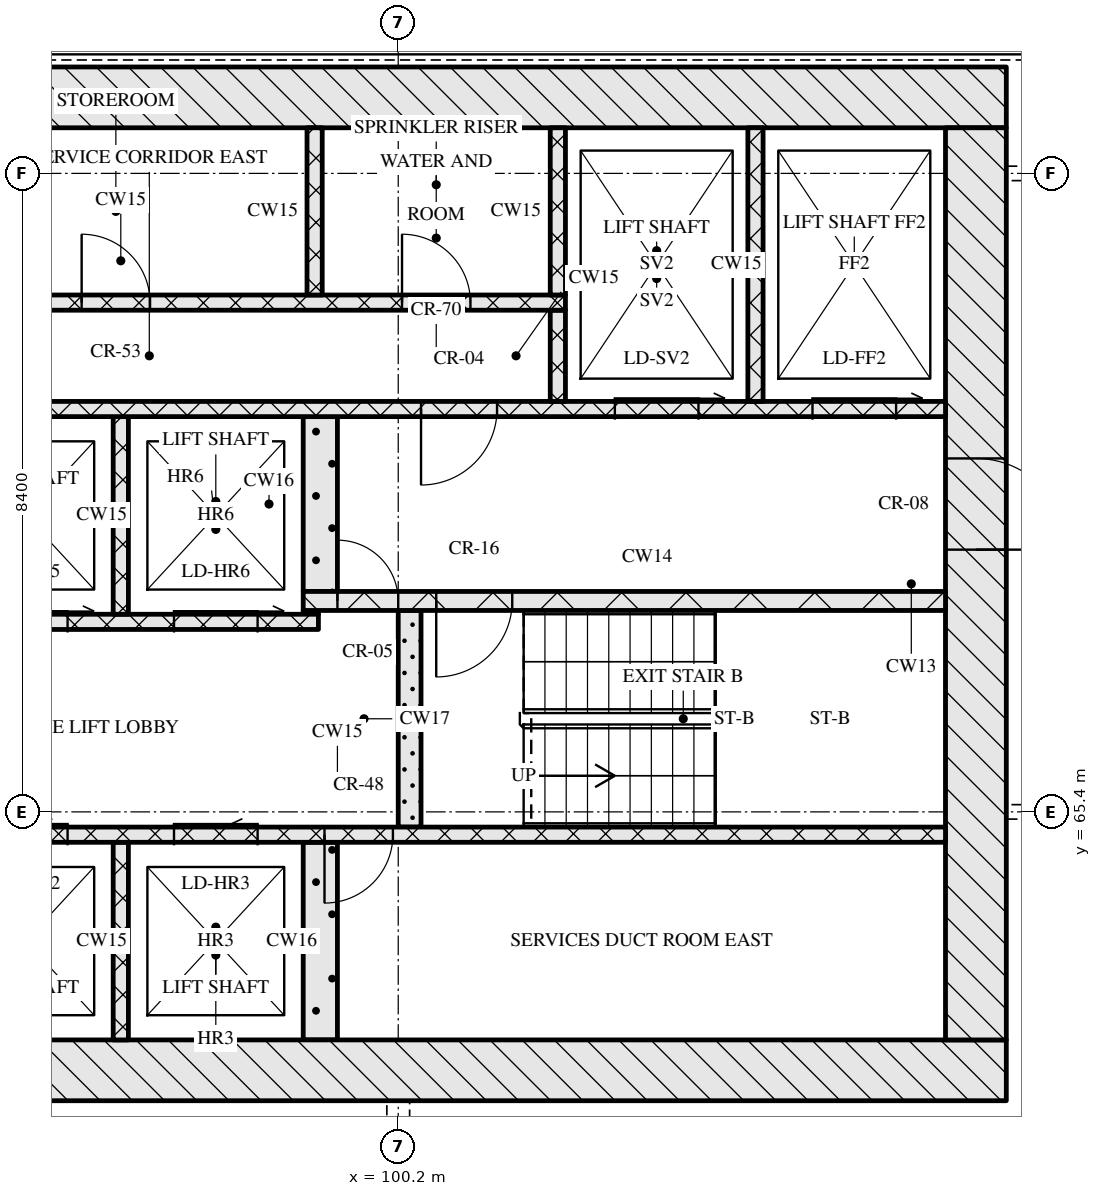
"""IFC4 building model, lengths in metres.
Left out: names, types, materials, properties, quantities, classifications, styles, units other than length and angle.
Written with IfcOpenShell. Run it as: python <this file> out.ifc"""

import sys

from ifc_helpers import new_model, si_unit, direction, frame, frame_2d, origin, place, context, subcontext, project, spatial, rectangle, extrude, element, fill, save


model = new_model("IFC4")
c1 = context("Model", 3, precision=1e-05, world=origin(), true_north=direction((0.0, 1.0)))
c2 = subcontext(c1, "Body", "Model", "MODEL_VIEW")
j1 = project(units=[si_unit("LENGTHUNIT", "METRE"), si_unit("PLANEANGLEUNIT", "RADIAN")], contexts=[c1])
p1 = place(None, origin())
s1 = spatial("IfcSite", under=j1, at=p1, CompositionType="ELEMENT")
p2 = place(p1, origin())
s2 = spatial("IfcBuilding", under=s1, at=p2, CompositionType="ELEMENT")
p3 = place(p2, frame((0.0, 0.0, 158.25)))
s3 = spatial("IfcBuildingStorey", under=s2, at=p3, CompositionType="ELEMENT", Elevation=158.25)
p4 = place(p3, frame((67.0, 62.0, 0.0), z_axis=(0.0, 0.0, 1.0), x_axis=(1.0, 0.0, 0.0)))
e1 = element("IfcWall", 1, at=p4, inside=s3, PredefinedType="SOLIDWALL", context=c2, shape_type="SweptSolid", body=[
    extrude(rectangle(XDim=41.2, YDim=0.8, at=frame_2d((20.6, 0.0))), origin(), (0.0, 0.0, 1.0), 3.32),
])
p5 = place(p4, frame((20.95, 0.0, 0.0)))
e2 = element("IfcOpeningElement", 2, at=p5, cuts=e1, PredefinedType="OPENING", context=c2, shape_type="SweptSolid", body=[
    extrude(rectangle(XDim=1.8, YDim=2.1, at=frame_2d((0.9, 1.05))), frame((0.0, 0.41, 0.0), z_axis=(0.0, -1.0, 0.0), x_axis=(1.0, 0.0, 0.0)), (0.0, 0.0, 1.0), 0.82),
])
p6 = place(p3, frame((67.0, 74.8, 0.0), z_axis=(0.0, 0.0, 1.0), x_axis=(1.0, 0.0, 0.0)))
e3 = element("IfcWall", 3, at=p6, inside=s3, PredefinedType="SOLIDWALL", context=c2, shape_type="SweptSolid", body=[
    extrude(rectangle(XDim=41.2, YDim=0.8, at=frame_2d((20.6, 0.0))), origin(), (0.0, 0.0, 1.0), 3.32),
])
p7 = place(p3, frame((107.8, 62.4, 0.0), z_axis=(0.0, 0.0, 1.0), x_axis=(0.0, 1.0, 0.0)))
e4 = element("IfcWall", 4, at=p7, inside=s3, PredefinedType="SOLIDWALL", context=c2, shape_type="SweptSolid", body=[
    extrude(rectangle(XDim=12.0, YDim=0.8, at=frame_2d((6.0, 0.0))), origin(), (0.0, 0.0, 1.0), 3.32),
])
p8 = place(p7, frame((6.45, 0.0, 0.0)))
e5 = element("IfcOpeningElement", 5, at=p8, cuts=e4, PredefinedType="OPENING", context=c2, shape_type="SweptSolid", body=[
    extrude(rectangle(XDim=1.2, YDim=2.1, at=frame_2d((0.6, 1.05))), frame((0.0, 0.41, 0.0), z_axis=(0.0, -1.0, 0.0), x_axis=(1.0, 0.0, 0.0)), (0.0, 0.0, 1.0), 0.82),
])
p9 = place(p3, frame((96.55, 62.4, 0.0), z_axis=(0.0, 0.0, 1.0), x_axis=(0.0, 1.0, 0.0)))
e6 = element("IfcWall", 6, at=p9, inside=s3, PredefinedType="SOLIDWALL", context=c2, shape_type="SweptSolid", body=[
    extrude(rectangle(XDim=2.6, YDim=0.2, at=frame_2d((1.3, 0.0))), origin(), (0.0, 0.0, 1.0), 3.32),
])
p10 = place(p3, frame((99.175, 62.4, 0.0), z_axis=(0.0, 0.0, 1.0), x_axis=(0.0, 1.0, 0.0)))
e7 = element("IfcWall", 7, at=p10, inside=s3, PredefinedType="SOLIDWALL", context=c2, shape_type="SweptSolid", body=[
    extrude(rectangle(XDim=2.6, YDim=0.45, at=frame_2d((1.3, 0.0))), origin(), (0.0, 0.0, 1.0), 3.32),
])
p11 = place(p3, frame((91.4, 65.1, 0.0), z_axis=(0.0, 0.0, 1.0), x_axis=(1.0, 0.0, 0.0)))
e8 = element("IfcWall", 8, at=p11, inside=s3, PredefinedType="SOLIDWALL", context=c2, shape_type="SweptSolid", body=[
    extrude(rectangle(XDim=16.0, YDim=0.2, at=frame_2d((8.0, 0.0))), origin(), (0.0, 0.0, 1.0), 3.32),
])
p12 = place(p11, frame((0.85, 0.0, 0.0)))
e9 = element("IfcOpeningElement", 9, at=p12, cuts=e8, PredefinedType="OPENING", context=c2, shape_type="SweptSolid", body=[
    extrude(rectangle(XDim=1.1, YDim=2.1, at=frame_2d((0.55, 1.05))), frame((0.0, 0.11, 0.0), z_axis=(0.0, -1.0, 0.0), x_axis=(1.0, 0.0, 0.0)), (0.0, 0.0, 1.0), 0.22),
])
p13 = place(p11, frame((3.35, 0.0, 0.0)))
e10 = element("IfcOpeningElement", 10, at=p13, cuts=e8, PredefinedType="OPENING", context=c2, shape_type="SweptSolid", body=[
    extrude(rectangle(XDim=1.1, YDim=2.1, at=frame_2d((0.55, 1.05))), frame((0.0, 0.11, 0.0), z_axis=(0.0, -1.0, 0.0), x_axis=(1.0, 0.0, 0.0)), (0.0, 0.0, 1.0), 0.22),
])
p14 = place(p11, frame((5.85, 0.0, 0.0)))
e11 = element("IfcOpeningElement", 11, at=p14, cuts=e8, PredefinedType="OPENING", context=c2, shape_type="SweptSolid", body=[
    extrude(rectangle(XDim=1.1, YDim=2.1, at=frame_2d((0.55, 1.05))), frame((0.0, 0.11, 0.0), z_axis=(0.0, -1.0, 0.0), x_axis=(1.0, 0.0, 0.0)), (0.0, 0.0, 1.0), 0.22),
])
p15 = place(p11, frame((7.83, 0.0, 0.0)))
e12 = element("IfcOpeningElement", 12, at=p15, cuts=e8, PredefinedType="OPENING", context=c2, shape_type="SweptSolid", body=[
    extrude(rectangle(XDim=0.9, YDim=2.1, at=frame_2d((0.45, 1.05))), frame((0.0, 0.11, 0.0), z_axis=(0.0, -1.0, 0.0), x_axis=(1.0, 0.0, 0.0)), (0.0, 0.0, 1.0), 0.22),
])
p16 = place(p3, frame((100.35, 65.2, 0.0), z_axis=(0.0, 0.0, 1.0), x_axis=(0.0, 1.0, 0.0)))
e13 = element("IfcWall", 13, at=p16, inside=s3, PredefinedType="SOLIDWALL", context=c2, shape_type="SweptSolid", body=[
    extrude(rectangle(XDim=2.85, YDim=0.3, at=frame_2d((1.425, 0.0))), origin(), (0.0, 0.0, 1.0), 3.32),
])
p17 = place(p3, frame((76.05, 67.9, 0.0), z_axis=(0.0, 0.0, 1.0), x_axis=(1.0, 0.0, 0.0)))
e14 = element("IfcWall", 14, at=p17, inside=s3, PredefinedType="SOLIDWALL", context=c2, shape_type="SweptSolid", body=[
    extrude(rectangle(XDim=23.1, YDim=0.2, at=frame_2d((11.55, 0.0))), origin(), (0.0, 0.0, 1.0), 3.32),
])
p18 = place(p17, frame((3.2, 0.0, 0.0)))
e15 = element("IfcOpeningElement", 15, at=p18, cuts=e14, PredefinedType="OPENING", context=c2, shape_type="SweptSolid", body=[
    extrude(rectangle(XDim=0.9, YDim=2.1, at=frame_2d((0.45, 1.05))), frame((0.0, 0.11, 0.0), z_axis=(0.0, -1.0, 0.0), x_axis=(1.0, 0.0, 0.0)), (0.0, 0.0, 1.0), 0.22),
])
p19 = place(p17, frame((9.7, 0.0, 0.0)))
e16 = element("IfcOpeningElement", 16, at=p19, cuts=e14, PredefinedType="OPENING", context=c2, shape_type="SweptSolid", body=[
    extrude(rectangle(XDim=0.9, YDim=2.1, at=frame_2d((0.45, 1.05))), frame((0.0, 0.11, 0.0), z_axis=(0.0, -1.0, 0.0), x_axis=(1.0, 0.0, 0.0)), (0.0, 0.0, 1.0), 0.22),
])
p20 = place(p17, frame((13.55, 0.0, 0.0)))
e17 = element("IfcOpeningElement", 17, at=p20, cuts=e14, PredefinedType="OPENING", context=c2, shape_type="SweptSolid", body=[
    extrude(rectangle(XDim=1.0, YDim=2.1, at=frame_2d((0.5, 1.05))), frame((0.0, 0.11, 0.0), z_axis=(0.0, -1.0, 0.0), x_axis=(1.0, 0.0, 0.0)), (0.0, 0.0, 1.0), 0.22),
])
p21 = place(p17, frame((16.2, 0.0, 0.0)))
e18 = element("IfcOpeningElement", 18, at=p21, cuts=e14, PredefinedType="OPENING", context=c2, shape_type="SweptSolid", body=[
    extrude(rectangle(XDim=1.1, YDim=2.1, at=frame_2d((0.55, 1.05))), frame((0.0, 0.11, 0.0), z_axis=(0.0, -1.0, 0.0), x_axis=(1.0, 0.0, 0.0)), (0.0, 0.0, 1.0), 0.22),
])
p22 = place(p17, frame((18.7, 0.0, 0.0)))
e19 = element("IfcOpeningElement", 19, at=p22, cuts=e14, PredefinedType="OPENING", context=c2, shape_type="SweptSolid", body=[
    extrude(rectangle(XDim=1.1, YDim=2.1, at=frame_2d((0.55, 1.05))), frame((0.0, 0.11, 0.0), z_axis=(0.0, -1.0, 0.0), x_axis=(1.0, 0.0, 0.0)), (0.0, 0.0, 1.0), 0.22),
])
p23 = place(p17, frame((21.2, 0.0, 0.0)))
e20 = element("IfcOpeningElement", 20, at=p23, cuts=e14, PredefinedType="OPENING", context=c2, shape_type="SweptSolid", body=[
    extrude(rectangle(XDim=1.1, YDim=2.1, at=frame_2d((0.55, 1.05))), frame((0.0, 0.11, 0.0), z_axis=(0.0, -1.0, 0.0), x_axis=(1.0, 0.0, 0.0)), (0.0, 0.0, 1.0), 0.22),
])
p24 = place(p3, frame((96.55, 68.0, 0.0), z_axis=(0.0, 0.0, 1.0), x_axis=(0.0, 1.0, 0.0)))
e21 = element("IfcWall", 21, at=p24, inside=s3, PredefinedType="SOLIDWALL", context=c2, shape_type="SweptSolid", body=[
    extrude(rectangle(XDim=2.6, YDim=0.2, at=frame_2d((1.3, 0.0))), origin(), (0.0, 0.0, 1.0), 3.32),
])
p25 = place(p3, frame((98.95, 68.025, 0.0), z_axis=(0.0, 0.0, 1.0), x_axis=(1.0, 0.0, 0.0)))
e22 = element("IfcWall", 22, at=p25, inside=s3, PredefinedType="SOLIDWALL", context=c2, shape_type="SweptSolid", body=[
    extrude(rectangle(XDim=0.2, YDim=0.05, at=frame_2d((0.1, 0.0))), origin(), (0.0, 0.0, 1.0), 3.32),
])
p26 = place(p3, frame((98.95, 68.175, 0.0), z_axis=(0.0, 0.0, 1.0), x_axis=(1.0, 0.0, 0.0)))
e23 = element("IfcWall", 23, at=p26, inside=s3, PredefinedType="SOLIDWALL", context=c2, shape_type="SweptSolid", body=[
    extrude(rectangle(XDim=8.45, YDim=0.25, at=frame_2d((4.225, 0.0))), origin(), (0.0, 0.0, 1.0), 3.32),
])
p27 = place(p26, frame((0.45, 0.0, 0.0)))
e24 = element("IfcOpeningElement", 24, at=p27, cuts=e23, PredefinedType="OPENING", context=c2, shape_type="SweptSolid", body=[
    extrude(rectangle(XDim=0.8, YDim=2.1, at=frame_2d((0.4, 1.05))), frame((0.0, 0.135, 0.0), z_axis=(0.0, -1.0, 0.0), x_axis=(1.0, 0.0, 0.0)), (0.0, 0.0, 1.0), 0.27),
])
p28 = place(p26, frame((1.75, 0.0, 0.0)))
e25 = element("IfcOpeningElement", 25, at=p28, cuts=e23, PredefinedType="OPENING", context=c2, shape_type="SweptSolid", body=[
    extrude(rectangle(XDim=1.0, YDim=2.1, at=frame_2d((0.5, 1.05))), frame((0.0, 0.135, 0.0), z_axis=(0.0, -1.0, 0.0), x_axis=(1.0, 0.0, 0.0)), (0.0, 0.0, 1.0), 0.27),
])
p29 = place(p3, frame((99.175, 68.3, 0.0), z_axis=(0.0, 0.0, 1.0), x_axis=(0.0, 1.0, 0.0)))
e26 = element("IfcWall", 26, at=p29, inside=s3, PredefinedType="SOLIDWALL", context=c2, shape_type="SweptSolid", body=[
    extrude(rectangle(XDim=2.3, YDim=0.45, at=frame_2d((1.15, 0.0))), origin(), (0.0, 0.0, 1.0), 3.32),
])
p30 = place(p3, frame((67.8, 70.7, 0.0), z_axis=(0.0, 0.0, 1.0), x_axis=(1.0, 0.0, 0.0)))
e27 = element("IfcWall", 27, at=p30, inside=s3, PredefinedType="SOLIDWALL", context=c2, shape_type="SweptSolid", body=[
    extrude(rectangle(XDim=39.6, YDim=0.2, at=frame_2d((19.8, 0.0))), origin(), (0.0, 0.0, 1.0), 3.32),
])
p31 = place(p30, frame((0.65, 0.0, 0.0)))
e28 = element("IfcOpeningElement", 28, at=p31, cuts=e27, PredefinedType="OPENING", context=c2, shape_type="SweptSolid", body=[
    extrude(rectangle(XDim=1.1, YDim=2.1, at=frame_2d((0.55, 1.05))), frame((0.0, 0.11, 0.0), z_axis=(0.0, -1.0, 0.0), x_axis=(1.0, 0.0, 0.0)), (0.0, 0.0, 1.0), 0.22),
])
p32 = place(p30, frame((3.25, 0.0, 0.0)))
e29 = element("IfcOpeningElement", 29, at=p32, cuts=e27, PredefinedType="OPENING", context=c2, shape_type="SweptSolid", body=[
    extrude(rectangle(XDim=1.1, YDim=2.1, at=frame_2d((0.55, 1.05))), frame((0.0, 0.11, 0.0), z_axis=(0.0, -1.0, 0.0), x_axis=(1.0, 0.0, 0.0)), (0.0, 0.0, 1.0), 0.22),
])
p33 = place(p30, frame((5.9, 0.0, 0.0)))
e30 = element("IfcOpeningElement", 30, at=p33, cuts=e27, PredefinedType="OPENING", context=c2, shape_type="SweptSolid", body=[
    extrude(rectangle(XDim=1.0, YDim=2.1, at=frame_2d((0.5, 1.05))), frame((0.0, 0.11, 0.0), z_axis=(0.0, -1.0, 0.0), x_axis=(1.0, 0.0, 0.0)), (0.0, 0.0, 1.0), 0.22),
])
p34 = place(p30, frame((21.7, 0.0, 0.0)))
e31 = element("IfcOpeningElement", 31, at=p34, cuts=e27, PredefinedType="OPENING", context=c2, shape_type="SweptSolid", body=[
    extrude(rectangle(XDim=1.0, YDim=2.1, at=frame_2d((0.5, 1.05))), frame((0.0, 0.11, 0.0), z_axis=(0.0, -1.0, 0.0), x_axis=(1.0, 0.0, 0.0)), (0.0, 0.0, 1.0), 0.22),
])
p35 = place(p30, frame((32.7, 0.0, 0.0)))
e32 = element("IfcOpeningElement", 32, at=p35, cuts=e27, PredefinedType="OPENING", context=c2, shape_type="SweptSolid", body=[
    extrude(rectangle(XDim=1.0, YDim=2.1, at=frame_2d((0.5, 1.05))), frame((0.0, 0.11, 0.0), z_axis=(0.0, -1.0, 0.0), x_axis=(1.0, 0.0, 0.0)), (0.0, 0.0, 1.0), 0.22),
])
p36 = place(p30, frame((35.25, 0.0, 0.0)))
e33 = element("IfcOpeningElement", 33, at=p36, cuts=e27, PredefinedType="OPENING", context=c2, shape_type="SweptSolid", body=[
    extrude(rectangle(XDim=1.1, YDim=2.1, at=frame_2d((0.55, 1.05))), frame((0.0, 0.11, 0.0), z_axis=(0.0, -1.0, 0.0), x_axis=(1.0, 0.0, 0.0)), (0.0, 0.0, 1.0), 0.22),
])
p37 = place(p30, frame((37.85, 0.0, 0.0)))
e34 = element("IfcOpeningElement", 34, at=p37, cuts=e27, PredefinedType="OPENING", context=c2, shape_type="SweptSolid", body=[
    extrude(rectangle(XDim=1.1, YDim=2.1, at=frame_2d((0.55, 1.05))), frame((0.0, 0.11, 0.0), z_axis=(0.0, -1.0, 0.0), x_axis=(1.0, 0.0, 0.0)), (0.0, 0.0, 1.0), 0.22),
])
p38 = place(p3, frame((102.3, 70.8, 0.0), z_axis=(0.0, 0.0, 1.0), x_axis=(0.0, 1.0, 0.0)))
e35 = element("IfcWall", 35, at=p38, inside=s3, PredefinedType="SOLIDWALL", context=c2, shape_type="SweptSolid", body=[
    extrude(rectangle(XDim=1.2, YDim=0.2, at=frame_2d((0.6, 0.0))), origin(), (0.0, 0.0, 1.0), 3.32),
])
p39 = place(p3, frame((104.9, 70.8, 0.0), z_axis=(0.0, 0.0, 1.0), x_axis=(0.0, 1.0, 0.0)))
e36 = element("IfcWall", 36, at=p39, inside=s3, PredefinedType="SOLIDWALL", context=c2, shape_type="SweptSolid", body=[
    extrude(rectangle(XDim=3.6, YDim=0.2, at=frame_2d((1.8, 0.0))), origin(), (0.0, 0.0, 1.0), 3.32),
])
p40 = place(p3, frame((90.7, 72.1, 0.0), z_axis=(0.0, 0.0, 1.0), x_axis=(1.0, 0.0, 0.0)))
e37 = element("IfcWall", 37, at=p40, inside=s3, PredefinedType="SOLIDWALL", context=c2, shape_type="SweptSolid", body=[
    extrude(rectangle(XDim=11.7, YDim=0.2, at=frame_2d((5.85, 0.0))), origin(), (0.0, 0.0, 1.0), 3.32),
])
p41 = place(p40, frame((1.6, 0.0, 0.0)))
e38 = element("IfcOpeningElement", 38, at=p41, cuts=e37, PredefinedType="OPENING", context=c2, shape_type="SweptSolid", body=[
    extrude(rectangle(XDim=0.9, YDim=2.1, at=frame_2d((0.45, 1.05))), frame((0.0, 0.11, 0.0), z_axis=(0.0, -1.0, 0.0), x_axis=(1.0, 0.0, 0.0)), (0.0, 0.0, 1.0), 0.22),
])
p42 = place(p40, frame((5.335, 0.0, 0.0)))
e39 = element("IfcOpeningElement", 39, at=p42, cuts=e37, PredefinedType="OPENING", context=c2, shape_type="SweptSolid", body=[
    extrude(rectangle(XDim=0.9, YDim=2.1, at=frame_2d((0.45, 1.05))), frame((0.0, 0.11, 0.0), z_axis=(0.0, -1.0, 0.0), x_axis=(1.0, 0.0, 0.0)), (0.0, 0.0, 1.0), 0.22),
])
p43 = place(p40, frame((9.55, 0.0, 0.0)))
e40 = element("IfcOpeningElement", 40, at=p43, cuts=e37, PredefinedType="OPENING", context=c2, shape_type="SweptSolid", body=[
    extrude(rectangle(XDim=0.9, YDim=2.1, at=frame_2d((0.45, 1.05))), frame((0.0, 0.11, 0.0), z_axis=(0.0, -1.0, 0.0), x_axis=(1.0, 0.0, 0.0)), (0.0, 0.0, 1.0), 0.22),
])
for number, where, z_axis, x_axis in (
    (41, (99.1, 72.2, 0.0), (0.0, 0.0, 1.0), (0.0, 1.0, 0.0)),
    (42, (102.3, 72.2, 0.0), (0.0, 0.0, 1.0), (0.0, 1.0, 0.0)),
):
    element("IfcWall", number, at=place(p3, frame(where, z_axis=z_axis, x_axis=x_axis)), inside=s3, PredefinedType="SOLIDWALL", context=c2, shape_type="SweptSolid", body=[
        extrude(rectangle(XDim=2.2, YDim=0.2, at=frame_2d((1.1, 0.0))), origin(), (0.0, 0.0, 1.0), 3.32),
    ])
p44 = place(p13, origin())
e43 = element("IfcDoor", 43, at=p44, inside=s3, OperationType="SLIDING_TO_LEFT", PredefinedType="DOOR", context=c2, shape_type="SweptSolid", body=[
    extrude(rectangle(XDim=1.1, YDim=2.1, at=frame_2d((0.55, 1.05))), frame((0.0, 0.025, 0.0), z_axis=(0.0, -1.0, 0.0), x_axis=(1.0, 0.0, 0.0)), (0.0, 0.0, 1.0), 0.05),
])
fill(e10, e43)
p45 = place(p14, origin())
e44 = element("IfcDoor", 44, at=p45, inside=s3, OperationType="SLIDING_TO_LEFT", PredefinedType="DOOR", context=c2, shape_type="SweptSolid", body=[
    extrude(rectangle(XDim=1.1, YDim=2.1, at=frame_2d((0.55, 1.05))), frame((0.0, 0.025, 0.0), z_axis=(0.0, -1.0, 0.0), x_axis=(1.0, 0.0, 0.0)), (0.0, 0.0, 1.0), 0.05),
])
fill(e11, e44)
p46 = place(p15, origin())
e45 = element("IfcDoor", 45, at=p46, inside=s3, OperationType="SINGLE_SWING_RIGHT", PredefinedType="DOOR", context=c2, shape_type="SweptSolid", body=[
    extrude(rectangle(XDim=0.9, YDim=2.1, at=frame_2d((0.45, 1.05))), frame((0.0, 0.025, 0.0), z_axis=(0.0, -1.0, 0.0), x_axis=(1.0, 0.0, 0.0)), (0.0, 0.0, 1.0), 0.05),
])
fill(e12, e45)
p47 = place(p22, origin())
e46 = element("IfcDoor", 46, at=p47, inside=s3, OperationType="SLIDING_TO_RIGHT", PredefinedType="DOOR", context=c2, shape_type="SweptSolid", body=[
    extrude(rectangle(XDim=1.1, YDim=2.1, at=frame_2d((0.55, 1.05))), frame((0.0, 0.025, 0.0), z_axis=(0.0, -1.0, 0.0), x_axis=(1.0, 0.0, 0.0)), (0.0, 0.0, 1.0), 0.05),
])
fill(e19, e46)
p48 = place(p23, origin())
e47 = element("IfcDoor", 47, at=p48, inside=s3, OperationType="SLIDING_TO_RIGHT", PredefinedType="DOOR", context=c2, shape_type="SweptSolid", body=[
    extrude(rectangle(XDim=1.1, YDim=2.1, at=frame_2d((0.55, 1.05))), frame((0.0, 0.025, 0.0), z_axis=(0.0, -1.0, 0.0), x_axis=(1.0, 0.0, 0.0)), (0.0, 0.0, 1.0), 0.05),
])
fill(e20, e47)
p49 = place(p27, origin())
e48 = element("IfcDoor", 48, at=p49, inside=s3, OperationType="SINGLE_SWING_LEFT", PredefinedType="DOOR", context=c2, shape_type="SweptSolid", body=[
    extrude(rectangle(XDim=0.8, YDim=2.1, at=frame_2d((0.4, 1.05))), frame((0.0, 0.025, 0.0), z_axis=(0.0, -1.0, 0.0), x_axis=(1.0, 0.0, 0.0)), (0.0, 0.0, 1.0), 0.05),
])
fill(e24, e48)
p50 = place(p28, origin())
e49 = element("IfcDoor", 49, at=p50, inside=s3, OperationType="SINGLE_SWING_RIGHT", PredefinedType="DOOR", context=c2, shape_type="SweptSolid", body=[
    extrude(rectangle(XDim=1.0, YDim=2.1, at=frame_2d((0.5, 1.05))), frame((0.0, 0.025, 0.0), z_axis=(0.0, -1.0, 0.0), x_axis=(1.0, 0.0, 0.0)), (0.0, 0.0, 1.0), 0.05),
])
fill(e25, e49)
p51 = place(p8, origin())
e50 = element("IfcDoor", 50, at=p51, inside=s3, OperationType="SINGLE_SWING_RIGHT", PredefinedType="DOOR", context=c2, shape_type="SweptSolid", body=[
    extrude(rectangle(XDim=1.2, YDim=2.1, at=frame_2d((0.6, 1.05))), frame((0.0, 0.025, 0.0), z_axis=(0.0, -1.0, 0.0), x_axis=(1.0, 0.0, 0.0)), (0.0, 0.0, 1.0), 0.05),
])
fill(e5, e50)
p52 = place(p35, origin())
e51 = element("IfcDoor", 51, at=p52, inside=s3, OperationType="SINGLE_SWING_RIGHT", PredefinedType="DOOR", context=c2, shape_type="SweptSolid", body=[
    extrude(rectangle(XDim=1.0, YDim=2.1, at=frame_2d((0.5, 1.05))), frame((0.0, 0.025, 0.0), z_axis=(0.0, -1.0, 0.0), x_axis=(1.0, 0.0, 0.0)), (0.0, 0.0, 1.0), 0.05),
])
fill(e32, e51)
p53 = place(p36, origin())
e52 = element("IfcDoor", 52, at=p53, inside=s3, OperationType="SLIDING_TO_RIGHT", PredefinedType="DOOR", context=c2, shape_type="SweptSolid", body=[
    extrude(rectangle(XDim=1.1, YDim=2.1, at=frame_2d((0.55, 1.05))), frame((0.0, 0.025, 0.0), z_axis=(0.0, -1.0, 0.0), x_axis=(1.0, 0.0, 0.0)), (0.0, 0.0, 1.0), 0.05),
])
fill(e33, e52)
p54 = place(p37, origin())
e53 = element("IfcDoor", 53, at=p54, inside=s3, OperationType="SLIDING_TO_RIGHT", PredefinedType="DOOR", context=c2, shape_type="SweptSolid", body=[
    extrude(rectangle(XDim=1.1, YDim=2.1, at=frame_2d((0.55, 1.05))), frame((0.0, 0.025, 0.0), z_axis=(0.0, -1.0, 0.0), x_axis=(1.0, 0.0, 0.0)), (0.0, 0.0, 1.0), 0.05),
])
fill(e34, e53)
p55 = place(p42, origin())
e54 = element("IfcDoor", 54, at=p55, inside=s3, OperationType="SINGLE_SWING_LEFT", PredefinedType="DOOR", context=c2, shape_type="SweptSolid", body=[
    extrude(rectangle(XDim=0.9, YDim=2.1, at=frame_2d((0.45, 1.05))), frame((0.0, 0.025, 0.0), z_axis=(0.0, -1.0, 0.0), x_axis=(1.0, 0.0, 0.0)), (0.0, 0.0, 1.0), 0.05),
])
fill(e39, e54)
p56 = place(p43, origin())
e55 = element("IfcDoor", 55, at=p56, inside=s3, OperationType="SINGLE_SWING_LEFT", PredefinedType="DOOR", context=c2, shape_type="SweptSolid", body=[
    extrude(rectangle(XDim=0.9, YDim=2.1, at=frame_2d((0.45, 1.05))), frame((0.0, 0.025, 0.0), z_axis=(0.0, -1.0, 0.0), x_axis=(1.0, 0.0, 0.0)), (0.0, 0.0, 1.0), 0.05),
])
fill(e40, e55)
save(model, sys.argv[1])
